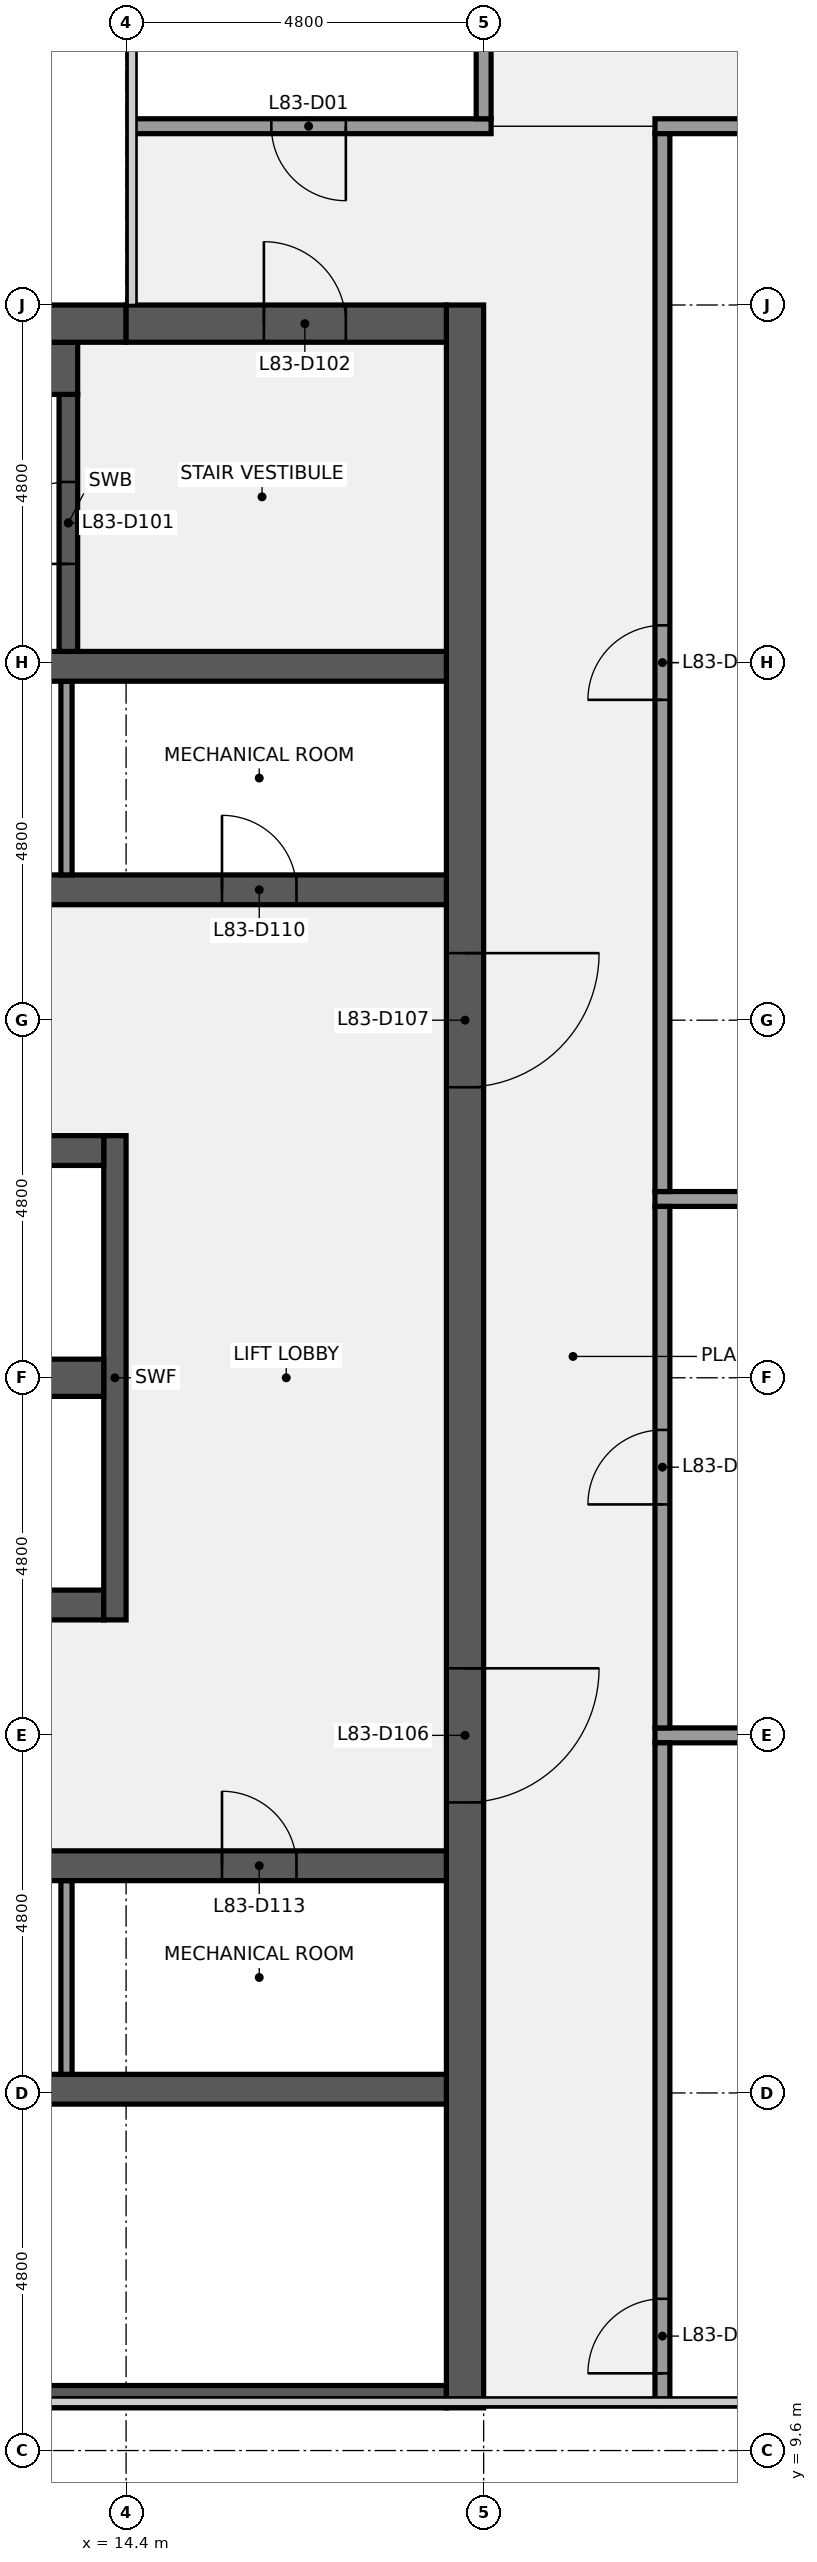
"""IFC4 building model, lengths in metres.
Left out: names, types, materials, properties, quantities, classifications, styles, units other than length and angle.
Written with IfcOpenShell. Run it as: python <this file> out.ifc"""

import sys

from ifc_helpers import new_model, si_unit, direction, frame, frame_2d, origin, place, context, subcontext, project, spatial, polyline, rectangle, outline, extrude, element, fill, save


model = new_model("IFC4")
c1 = context("Model", 3, precision=1e-05, world=origin(), true_north=direction((0.0, 1.0)))
c2 = subcontext(c1, "Body", "Model", "MODEL_VIEW")
j1 = project(units=[si_unit("LENGTHUNIT", "METRE"), si_unit("PLANEANGLEUNIT", "RADIAN")], contexts=[c1])
p1 = place(None, origin())
s1 = spatial("IfcSite", under=j1, at=p1, CompositionType="ELEMENT")
p2 = place(p1, origin())
s2 = spatial("IfcBuilding", under=s1, at=p2, CompositionType="ELEMENT")
p3 = place(p2, frame((0.0, 0.0, 370.3)))
s3 = spatial("IfcBuildingStorey", under=s2, at=p3, CompositionType="ELEMENT", Elevation=370.3)
p4 = place(p3, frame((18.7, 10.323, 0.0), z_axis=(0.0, 0.0, 1.0), x_axis=(-1.0, 0.0, 0.0)))
e1 = element("IfcWall", 1, at=p4, inside=s3, PredefinedType="SHEAR", context=c2, shape_type="SweptSolid", body=[
    extrude(outline(polyline([(0.0, 0.0), (18.2, 0.0), (18.2, 2.639), (0.0, 2.639), (0.0, 0.0)])), frame((0.0, 0.15, 0.0), z_axis=(0.0, -1.0, 0.0), x_axis=(1.0, 0.0, 0.0)), (0.0, 0.0, 1.0), 0.3),
])
p5 = place(p3, frame((18.95, 38.4, 0.0), z_axis=(0.0, 0.0, 1.0), x_axis=(0.0, -1.0, 0.0)))
e2 = element("IfcWall", 2, at=p5, inside=s3, PredefinedType="SHEAR", context=c2, shape_type="SweptSolid", body=[
    extrude(outline(polyline([(0.0, 0.0), (28.227, 0.0), (28.227, 2.488), (26.98, 3.75), (0.0, 3.75), (0.0, 0.0)])), frame((0.0, 0.25, 0.0), z_axis=(0.0, -1.0, 0.0), x_axis=(1.0, 0.0, 0.0)), (0.0, 0.0, 1.0), 0.5),
])
p6 = place(p5, frame((18.3, 0.0, 0.0)))
e3 = element("IfcOpeningElement", 3, at=p6, cuts=e2, PredefinedType="OPENING", context=c2, shape_type="SweptSolid", body=[
    extrude(rectangle(XDim=1.8, YDim=2.1, at=frame_2d((0.9, 1.05))), frame((0.0, 0.26, 0.0), z_axis=(0.0, -1.0, 0.0), x_axis=(1.0, 0.0, 0.0)), (0.0, 0.0, 1.0), 0.52),
])
p7 = place(p5, frame((8.7, 0.0, 0.0)))
e4 = element("IfcOpeningElement", 4, at=p7, cuts=e2, PredefinedType="OPENING", context=c2, shape_type="SweptSolid", body=[
    extrude(rectangle(XDim=1.8, YDim=2.1, at=frame_2d((0.9, 1.05))), frame((0.0, 0.26, 0.0), z_axis=(0.0, -1.0, 0.0), x_axis=(1.0, 0.0, 0.0)), (0.0, 0.0, 1.0), 0.52),
])
p8 = place(p3, frame((0.5, 14.45, 0.0), z_axis=(0.0, 0.0, 1.0), x_axis=(1.0, 0.0, 0.0)))
e5 = element("IfcWall", 5, at=p8, inside=s3, PredefinedType="SHEAR", context=c2, shape_type="SweptSolid", body=[
    extrude(rectangle(XDim=18.2, YDim=0.4, at=frame_2d((9.1, 0.0))), origin(), (0.0, 0.0, 1.0), 3.75),
])
p9 = place(p8, frame((4.5, 0.0, 0.0)))
e6 = element("IfcOpeningElement", 6, at=p9, cuts=e5, PredefinedType="OPENING", context=c2, shape_type="SweptSolid", body=[
    extrude(rectangle(XDim=1.0, YDim=2.1, at=frame_2d((0.5, 1.05))), frame((0.0, 0.21, 0.0), z_axis=(0.0, -1.0, 0.0), x_axis=(1.0, 0.0, 0.0)), (0.0, 0.0, 1.0), 0.42),
])
p10 = place(p3, frame((13.6, 14.65, 0.0), z_axis=(0.0, 0.0, 1.0), x_axis=(0.0, 1.0, 0.0)))
e7 = element("IfcWall", 7, at=p10, inside=s3, PredefinedType="PARTITIONING", context=c2, shape_type="SweptSolid", body=[
    extrude(rectangle(XDim=2.6, YDim=0.15, at=frame_2d((1.3, 0.0))), origin(), (0.0, 0.0, 1.0), 3.75),
])
p11 = place(p3, frame((0.5, 17.45, 0.0), z_axis=(0.0, 0.0, 1.0), x_axis=(1.0, 0.0, 0.0)))
e8 = element("IfcWall", 8, at=p11, inside=s3, PredefinedType="SHEAR", context=c2, shape_type="SweptSolid", body=[
    extrude(rectangle(XDim=18.2, YDim=0.4, at=frame_2d((9.1, 0.0))), origin(), (0.0, 0.0, 1.0), 3.75),
])
p12 = place(p11, frame((3.613, 0.0, 0.0)))
e9 = element("IfcOpeningElement", 9, at=p12, cuts=e8, PredefinedType="OPENING", context=c2, shape_type="SweptSolid", body=[
    extrude(rectangle(XDim=1.0, YDim=2.1, at=frame_2d((0.5, 1.05))), frame((0.0, 0.21, 0.0), z_axis=(0.0, -1.0, 0.0), x_axis=(1.0, 0.0, 0.0)), (0.0, 0.0, 1.0), 0.42),
])
p13 = place(p11, frame((10.2, 0.0, 0.0)))
e10 = element("IfcOpeningElement", 10, at=p13, cuts=e8, PredefinedType="OPENING", context=c2, shape_type="SweptSolid", body=[
    extrude(rectangle(XDim=1.0, YDim=2.1, at=frame_2d((0.5, 1.05))), frame((0.0, 0.21, 0.0), z_axis=(0.0, -1.0, 0.0), x_axis=(1.0, 0.0, 0.0)), (0.0, 0.0, 1.0), 0.42),
])
p14 = place(p11, frame((15.188, 0.0, 0.0)))
e11 = element("IfcOpeningElement", 11, at=p14, cuts=e8, PredefinedType="OPENING", context=c2, shape_type="SweptSolid", body=[
    extrude(rectangle(XDim=1.0, YDim=2.1, at=frame_2d((0.5, 1.05))), frame((0.0, 0.21, 0.0), z_axis=(0.0, -1.0, 0.0), x_axis=(1.0, 0.0, 0.0)), (0.0, 0.0, 1.0), 0.42),
])
p15 = place(p3, frame((0.5, 20.95, 0.0), z_axis=(0.0, 0.0, 1.0), x_axis=(1.0, 0.0, 0.0)))
e12 = element("IfcWall", 12, at=p15, inside=s3, PredefinedType="SHEAR", context=c2, shape_type="SweptSolid", body=[
    extrude(rectangle(XDim=13.6, YDim=0.4, at=frame_2d((6.8, 0.0))), origin(), (0.0, 0.0, 1.0), 3.75),
])
p16 = place(p15, frame((6.35, 0.0, 0.0)))
e13 = element("IfcOpeningElement", 13, at=p16, cuts=e12, PredefinedType="OPENING", context=c2, shape_type="SweptSolid", body=[
    extrude(rectangle(XDim=1.1, YDim=2.1, at=frame_2d((0.55, 1.05))), frame((0.0, 0.21, 0.0), z_axis=(0.0, -1.0, 0.0), x_axis=(1.0, 0.0, 0.0)), (0.0, 0.0, 1.0), 0.42),
])
p17 = place(p15, frame((11.3, 0.0, 0.0)))
e14 = element("IfcOpeningElement", 14, at=p17, cuts=e12, PredefinedType="OPENING", context=c2, shape_type="SweptSolid", body=[
    extrude(rectangle(XDim=1.0, YDim=2.1, at=frame_2d((0.5, 1.05))), frame((0.0, 0.21, 0.0), z_axis=(0.0, -1.0, 0.0), x_axis=(1.0, 0.0, 0.0)), (0.0, 0.0, 1.0), 0.42),
])
p18 = place(p3, frame((14.25, 20.75, 0.0), z_axis=(0.0, 0.0, 1.0), x_axis=(0.0, 1.0, 0.0)))
e15 = element("IfcWall", 15, at=p18, inside=s3, PredefinedType="SHEAR", context=c2, shape_type="SweptSolid", body=[
    extrude(rectangle(XDim=6.5, YDim=0.3, at=frame_2d((3.25, 0.0))), origin(), (0.0, 0.0, 1.0), 3.75),
])
p19 = place(p3, frame((0.5, 24.0, 0.0), z_axis=(0.0, 0.0, 1.0), x_axis=(1.0, 0.0, 0.0)))
e16 = element("IfcWall", 16, at=p19, inside=s3, PredefinedType="SHEAR", context=c2, shape_type="SweptSolid", body=[
    extrude(rectangle(XDim=13.6, YDim=0.5, at=frame_2d((6.8, 0.0))), origin(), (0.0, 0.0, 1.0), 3.75),
])
p20 = place(p3, frame((0.5, 27.05, 0.0), z_axis=(0.0, 0.0, 1.0), x_axis=(1.0, 0.0, 0.0)))
e17 = element("IfcWall", 17, at=p20, inside=s3, PredefinedType="SHEAR", context=c2, shape_type="SweptSolid", body=[
    extrude(rectangle(XDim=13.6, YDim=0.4, at=frame_2d((6.8, 0.0))), origin(), (0.0, 0.0, 1.0), 3.75),
])
p21 = place(p20, frame((3.9, 0.0, 0.0)))
e18 = element("IfcOpeningElement", 18, at=p21, cuts=e17, PredefinedType="OPENING", context=c2, shape_type="SweptSolid", body=[
    extrude(rectangle(XDim=1.0, YDim=2.1, at=frame_2d((0.5, 1.05))), frame((0.0, 0.21, 0.0), z_axis=(0.0, -1.0, 0.0), x_axis=(1.0, 0.0, 0.0)), (0.0, 0.0, 1.0), 0.42),
])
p22 = place(p20, frame((10.9, 0.0, 0.0)))
e19 = element("IfcOpeningElement", 19, at=p22, cuts=e17, PredefinedType="OPENING", context=c2, shape_type="SweptSolid", body=[
    extrude(rectangle(XDim=1.2, YDim=2.1, at=frame_2d((0.6, 1.05))), frame((0.0, 0.21, 0.0), z_axis=(0.0, -1.0, 0.0), x_axis=(1.0, 0.0, 0.0)), (0.0, 0.0, 1.0), 0.42),
])
p23 = place(p3, frame((0.5, 30.55, 0.0), z_axis=(0.0, 0.0, 1.0), x_axis=(1.0, 0.0, 0.0)))
e20 = element("IfcWall", 20, at=p23, inside=s3, PredefinedType="SHEAR", context=c2, shape_type="SweptSolid", body=[
    extrude(rectangle(XDim=18.2, YDim=0.4, at=frame_2d((9.1, 0.0))), origin(), (0.0, 0.0, 1.0), 3.75),
])
p24 = place(p23, frame((3.613, 0.0, 0.0)))
e21 = element("IfcOpeningElement", 21, at=p24, cuts=e20, PredefinedType="OPENING", context=c2, shape_type="SweptSolid", body=[
    extrude(rectangle(XDim=1.0, YDim=2.1, at=frame_2d((0.5, 1.05))), frame((0.0, 0.21, 0.0), z_axis=(0.0, -1.0, 0.0), x_axis=(1.0, 0.0, 0.0)), (0.0, 0.0, 1.0), 0.42),
])
p25 = place(p23, frame((10.2, 0.0, 0.0)))
e22 = element("IfcOpeningElement", 22, at=p25, cuts=e20, PredefinedType="OPENING", context=c2, shape_type="SweptSolid", body=[
    extrude(rectangle(XDim=1.0, YDim=2.1, at=frame_2d((0.5, 1.05))), frame((0.0, 0.21, 0.0), z_axis=(0.0, -1.0, 0.0), x_axis=(1.0, 0.0, 0.0)), (0.0, 0.0, 1.0), 0.42),
])
p26 = place(p23, frame((15.188, 0.0, 0.0)))
e23 = element("IfcOpeningElement", 23, at=p26, cuts=e20, PredefinedType="OPENING", context=c2, shape_type="SweptSolid", body=[
    extrude(rectangle(XDim=1.0, YDim=2.1, at=frame_2d((0.5, 1.05))), frame((0.0, 0.21, 0.0), z_axis=(0.0, -1.0, 0.0), x_axis=(1.0, 0.0, 0.0)), (0.0, 0.0, 1.0), 0.42),
])
p27 = place(p3, frame((13.6, 30.75, 0.0), z_axis=(0.0, 0.0, 1.0), x_axis=(0.0, 1.0, 0.0)))
e24 = element("IfcWall", 24, at=p27, inside=s3, PredefinedType="PARTITIONING", context=c2, shape_type="SweptSolid", body=[
    extrude(rectangle(XDim=2.6, YDim=0.15, at=frame_2d((1.3, 0.0))), origin(), (0.0, 0.0, 1.0), 3.75),
])
p28 = place(p3, frame((0.5, 33.55, 0.0), z_axis=(0.0, 0.0, 1.0), x_axis=(1.0, 0.0, 0.0)))
e25 = element("IfcWall", 25, at=p28, inside=s3, PredefinedType="SHEAR", context=c2, shape_type="SweptSolid", body=[
    extrude(rectangle(XDim=18.2, YDim=0.4, at=frame_2d((9.1, 0.0))), origin(), (0.0, 0.0, 1.0), 3.75),
])
p29 = place(p3, frame((13.625, 33.75, 0.0), z_axis=(0.0, 0.0, 1.0), x_axis=(0.0, 1.0, 0.0)))
e26 = element("IfcWall", 26, at=p29, inside=s3, PredefinedType="SHEAR", context=c2, shape_type="SweptSolid", body=[
    extrude(rectangle(XDim=3.45, YDim=0.25, at=frame_2d((1.725, 0.0))), origin(), (0.0, 0.0, 1.0), 3.75),
])
p30 = place(p29, frame((1.175, 0.0, 0.0)))
e27 = element("IfcOpeningElement", 27, at=p30, cuts=e26, PredefinedType="OPENING", context=c2, shape_type="SweptSolid", body=[
    extrude(rectangle(XDim=1.1, YDim=2.1, at=frame_2d((0.55, 1.05))), frame((0.0, 0.135, 0.0), z_axis=(0.0, -1.0, 0.0), x_axis=(1.0, 0.0, 0.0)), (0.0, 0.0, 1.0), 0.27),
])
p31 = place(p3, frame((6.25, 37.55, 0.0), z_axis=(0.0, 0.0, 1.0), x_axis=(1.0, 0.0, 0.0)))
e28 = element("IfcWall", 28, at=p31, inside=s3, PredefinedType="SHEAR", context=c2, shape_type="SweptSolid", body=[
    extrude(rectangle(XDim=7.5, YDim=0.7, at=frame_2d((3.75, 0.0))), origin(), (0.0, 0.0, 1.0), 3.75),
])
p32 = place(p3, frame((0.5, 38.15, 0.0), z_axis=(0.0, 0.0, 1.0), x_axis=(1.0, 0.0, 0.0)))
e29 = element("IfcWall", 29, at=p32, inside=s3, PredefinedType="SHEAR", context=c2, shape_type="SweptSolid", body=[
    extrude(rectangle(XDim=13.9, YDim=0.5, at=frame_2d((6.95, 0.0))), origin(), (0.0, 0.0, 1.0), 3.75),
])
p33 = place(p3, frame((14.4, 38.15, 0.0), z_axis=(0.0, 0.0, 1.0), x_axis=(1.0, 0.0, 0.0)))
e30 = element("IfcWall", 30, at=p33, inside=s3, PredefinedType="SHEAR", context=c2, shape_type="SweptSolid", body=[
    extrude(rectangle(XDim=4.3, YDim=0.5, at=frame_2d((2.15, 0.0))), origin(), (0.0, 0.0, 1.0), 3.75),
])
p34 = place(p33, frame((1.85, 0.0, 0.0)))
e31 = element("IfcOpeningElement", 31, at=p34, cuts=e30, PredefinedType="OPENING", context=c2, shape_type="SweptSolid", body=[
    extrude(rectangle(XDim=1.1, YDim=2.1, at=frame_2d((0.55, 1.05))), frame((0.0, 0.26, 0.0), z_axis=(0.0, -1.0, 0.0), x_axis=(1.0, 0.0, 0.0)), (0.0, 0.0, 1.0), 0.52),
])
for number, where, z_axis, x_axis in (
    (32, (21.5, 19.2, 0.0), (0.0, 0.0, 1.0), (1.0, 0.0, 0.0)),
    (33, (21.5, 26.4, 0.0), (0.0, 0.0, 1.0), (1.0, 0.0, 0.0)),
):
    element("IfcWall", number, at=place(p3, frame(where, z_axis=z_axis, x_axis=x_axis)), inside=s3, PredefinedType="PARTITIONING", context=c2, shape_type="SweptSolid", body=[
        extrude(rectangle(XDim=14.6, YDim=0.2, at=frame_2d((7.3, 0.0))), origin(), (0.0, 0.0, 1.0), 2.759),
    ])
p35 = place(p3, frame((14.5, 40.8, 0.0), z_axis=(0.0, 0.0, 1.0), x_axis=(1.0, 0.0, 0.0)))
e34 = element("IfcWall", 34, at=p35, inside=s3, PredefinedType="PARTITIONING", context=c2, shape_type="SweptSolid", body=[
    extrude(rectangle(XDim=4.8, YDim=0.2, at=frame_2d((2.4, 0.0))), origin(), (0.0, 0.0, 1.0), 2.759),
])
p36 = place(p35, frame((1.85, 0.0, 0.0)))
e35 = element("IfcOpeningElement", 35, at=p36, cuts=e34, PredefinedType="OPENING", context=c2, shape_type="SweptSolid", body=[
    extrude(rectangle(XDim=1.0, YDim=2.1, at=frame_2d((0.5, 1.05))), frame((0.0, 0.11, 0.0), z_axis=(0.0, -1.0, 0.0), x_axis=(1.0, 0.0, 0.0)), (0.0, 0.0, 1.0), 0.22),
])
p37 = place(p3, frame((21.5, 40.8, 0.0), z_axis=(0.0, 0.0, 1.0), x_axis=(1.0, 0.0, 0.0)))
e36 = element("IfcWall", 36, at=p37, inside=s3, PredefinedType="PARTITIONING", context=c2, shape_type="SweptSolid", body=[
    extrude(rectangle(XDim=14.6, YDim=0.2, at=frame_2d((7.3, 0.0))), origin(), (0.0, 0.0, 1.0), 2.759),
])
p38 = place(p3, frame((19.2, 40.9, 0.0), z_axis=(0.0, 0.0, 1.0), x_axis=(0.0, 1.0, 0.0)))
e37 = element("IfcWall", 37, at=p38, inside=s3, PredefinedType="PARTITIONING", context=c2, shape_type="SweptSolid", body=[
    extrude(rectangle(XDim=2.2, YDim=0.2, at=frame_2d((1.1, 0.0))), origin(), (0.0, 0.0, 1.0), 2.759),
])
p39 = place(p3, frame((21.6, 10.273, 0.0), z_axis=(0.0, 0.0, 1.0), x_axis=(0.0, 1.0, 0.0)))
e38 = element("IfcWall", 38, at=p39, inside=s3, PredefinedType="PARTITIONING", context=c2, shape_type="SweptSolid", body=[
    extrude(rectangle(XDim=8.827, YDim=0.2, at=frame_2d((4.414, 0.0))), origin(), (0.0, 0.0, 1.0), 2.759),
])
p40 = place(p39, frame((0.364, 0.0, 0.0)))
e39 = element("IfcOpeningElement", 39, at=p40, cuts=e38, PredefinedType="OPENING", context=c2, shape_type="SweptSolid", body=[
    extrude(rectangle(XDim=1.0, YDim=2.1, at=frame_2d((0.5, 1.05))), frame((0.0, 0.11, 0.0), z_axis=(0.0, -1.0, 0.0), x_axis=(1.0, 0.0, 0.0)), (0.0, 0.0, 1.0), 0.22),
])
p41 = place(p3, frame((21.6, 19.3, 0.0), z_axis=(0.0, 0.0, 1.0), x_axis=(0.0, 1.0, 0.0)))
e40 = element("IfcWall", 40, at=p41, inside=s3, PredefinedType="PARTITIONING", context=c2, shape_type="SweptSolid", body=[
    extrude(rectangle(XDim=7.0, YDim=0.2, at=frame_2d((3.5, 0.0))), origin(), (0.0, 0.0, 1.0), 2.759),
])
p42 = place(p41, frame((3.0, 0.0, 0.0)))
e41 = element("IfcOpeningElement", 41, at=p42, cuts=e40, PredefinedType="OPENING", context=c2, shape_type="SweptSolid", body=[
    extrude(rectangle(XDim=1.0, YDim=2.1, at=frame_2d((0.5, 1.05))), frame((0.0, 0.11, 0.0), z_axis=(0.0, -1.0, 0.0), x_axis=(1.0, 0.0, 0.0)), (0.0, 0.0, 1.0), 0.22),
])
p43 = place(p3, frame((21.6, 26.5, 0.0), z_axis=(0.0, 0.0, 1.0), x_axis=(0.0, 1.0, 0.0)))
e42 = element("IfcWall", 42, at=p43, inside=s3, PredefinedType="PARTITIONING", context=c2, shape_type="SweptSolid", body=[
    extrude(rectangle(XDim=14.2, YDim=0.2, at=frame_2d((7.1, 0.0))), origin(), (0.0, 0.0, 1.0), 2.759),
])
p44 = place(p43, frame((6.6, 0.0, 0.0)))
e43 = element("IfcOpeningElement", 43, at=p44, cuts=e42, PredefinedType="OPENING", context=c2, shape_type="SweptSolid", body=[
    extrude(rectangle(XDim=1.0, YDim=2.1, at=frame_2d((0.5, 1.05))), frame((0.0, 0.11, 0.0), z_axis=(0.0, -1.0, 0.0), x_axis=(1.0, 0.0, 0.0)), (0.0, 0.0, 1.0), 0.22),
])
p45 = place(p30, origin())
e44 = element("IfcDoor", 44, at=p45, inside=s3, OperationType="SINGLE_SWING_LEFT", PredefinedType="DOOR", context=c2, shape_type="SweptSolid", body=[
    extrude(rectangle(XDim=1.1, YDim=2.1, at=frame_2d((0.55, 1.05))), frame((0.0, 0.025, 0.0), z_axis=(0.0, -1.0, 0.0), x_axis=(1.0, 0.0, 0.0)), (0.0, 0.0, 1.0), 0.05),
])
fill(e27, e44)
p46 = place(p34, origin())
e45 = element("IfcDoor", 45, at=p46, inside=s3, OperationType="SINGLE_SWING_LEFT", PredefinedType="DOOR", context=c2, shape_type="SweptSolid", body=[
    extrude(rectangle(XDim=1.1, YDim=2.1, at=frame_2d((0.55, 1.05))), frame((0.0, 0.025, 0.0), z_axis=(0.0, -1.0, 0.0), x_axis=(1.0, 0.0, 0.0)), (0.0, 0.0, 1.0), 0.05),
])
fill(e31, e45)
p47 = place(p6, origin())
e46 = element("IfcDoor", 46, at=p47, inside=s3, OperationType="DOUBLE_DOOR_SINGLE_SWING", PredefinedType="DOOR", context=c2, shape_type="SweptSolid", body=[
    extrude(rectangle(XDim=1.8, YDim=2.1, at=frame_2d((0.9, 1.05))), frame((0.0, 0.025, 0.0), z_axis=(0.0, -1.0, 0.0), x_axis=(1.0, 0.0, 0.0)), (0.0, 0.0, 1.0), 0.05),
])
fill(e3, e46)
p48 = place(p7, origin())
e47 = element("IfcDoor", 47, at=p48, inside=s3, OperationType="DOUBLE_DOOR_SINGLE_SWING", PredefinedType="DOOR", context=c2, shape_type="SweptSolid", body=[
    extrude(rectangle(XDim=1.8, YDim=2.1, at=frame_2d((0.9, 1.05))), frame((0.0, 0.025, 0.0), z_axis=(0.0, -1.0, 0.0), x_axis=(1.0, 0.0, 0.0)), (0.0, 0.0, 1.0), 0.05),
])
fill(e4, e47)
p49 = place(p26, origin())
e48 = element("IfcDoor", 48, at=p49, inside=s3, OperationType="SINGLE_SWING_LEFT", PredefinedType="DOOR", context=c2, shape_type="SweptSolid", body=[
    extrude(rectangle(XDim=1.0, YDim=2.1, at=frame_2d((0.5, 1.05))), frame((0.0, 0.025, 0.0), z_axis=(0.0, -1.0, 0.0), x_axis=(1.0, 0.0, 0.0)), (0.0, 0.0, 1.0), 0.05),
])
fill(e23, e48)
p50 = place(p14, origin())
e49 = element("IfcDoor", 49, at=p50, inside=s3, OperationType="SINGLE_SWING_LEFT", PredefinedType="DOOR", context=c2, shape_type="SweptSolid", body=[
    extrude(rectangle(XDim=1.0, YDim=2.1, at=frame_2d((0.5, 1.05))), frame((0.0, 0.025, 0.0), z_axis=(0.0, -1.0, 0.0), x_axis=(1.0, 0.0, 0.0)), (0.0, 0.0, 1.0), 0.05),
])
fill(e11, e49)
p51 = place(p36, origin())
e50 = element("IfcDoor", 50, at=p51, inside=s3, OperationType="SINGLE_SWING_RIGHT", PredefinedType="DOOR", context=c2, shape_type="SweptSolid", body=[
    extrude(rectangle(XDim=1.0, YDim=2.1, at=frame_2d((0.5, 1.05))), frame((0.0, 0.025, 0.0), z_axis=(0.0, -1.0, 0.0), x_axis=(1.0, 0.0, 0.0)), (0.0, 0.0, 1.0), 0.05),
])
fill(e35, e50)
p52 = place(p40, origin())
e51 = element("IfcDoor", 51, at=p52, inside=s3, OperationType="SINGLE_SWING_LEFT", PredefinedType="DOOR", context=c2, shape_type="SweptSolid", body=[
    extrude(rectangle(XDim=1.0, YDim=2.1, at=frame_2d((0.5, 1.05))), frame((0.0, 0.025, 0.0), z_axis=(0.0, -1.0, 0.0), x_axis=(1.0, 0.0, 0.0)), (0.0, 0.0, 1.0), 0.05),
])
fill(e39, e51)
p53 = place(p42, origin())
e52 = element("IfcDoor", 52, at=p53, inside=s3, OperationType="SINGLE_SWING_LEFT", PredefinedType="DOOR", context=c2, shape_type="SweptSolid", body=[
    extrude(rectangle(XDim=1.0, YDim=2.1, at=frame_2d((0.5, 1.05))), frame((0.0, 0.025, 0.0), z_axis=(0.0, -1.0, 0.0), x_axis=(1.0, 0.0, 0.0)), (0.0, 0.0, 1.0), 0.05),
])
fill(e41, e52)
p54 = place(p44, origin())
e53 = element("IfcDoor", 53, at=p54, inside=s3, OperationType="SINGLE_SWING_LEFT", PredefinedType="DOOR", context=c2, shape_type="SweptSolid", body=[
    extrude(rectangle(XDim=1.0, YDim=2.1, at=frame_2d((0.5, 1.05))), frame((0.0, 0.025, 0.0), z_axis=(0.0, -1.0, 0.0), x_axis=(1.0, 0.0, 0.0)), (0.0, 0.0, 1.0), 0.05),
])
fill(e43, e53)
save(model, sys.argv[1])
